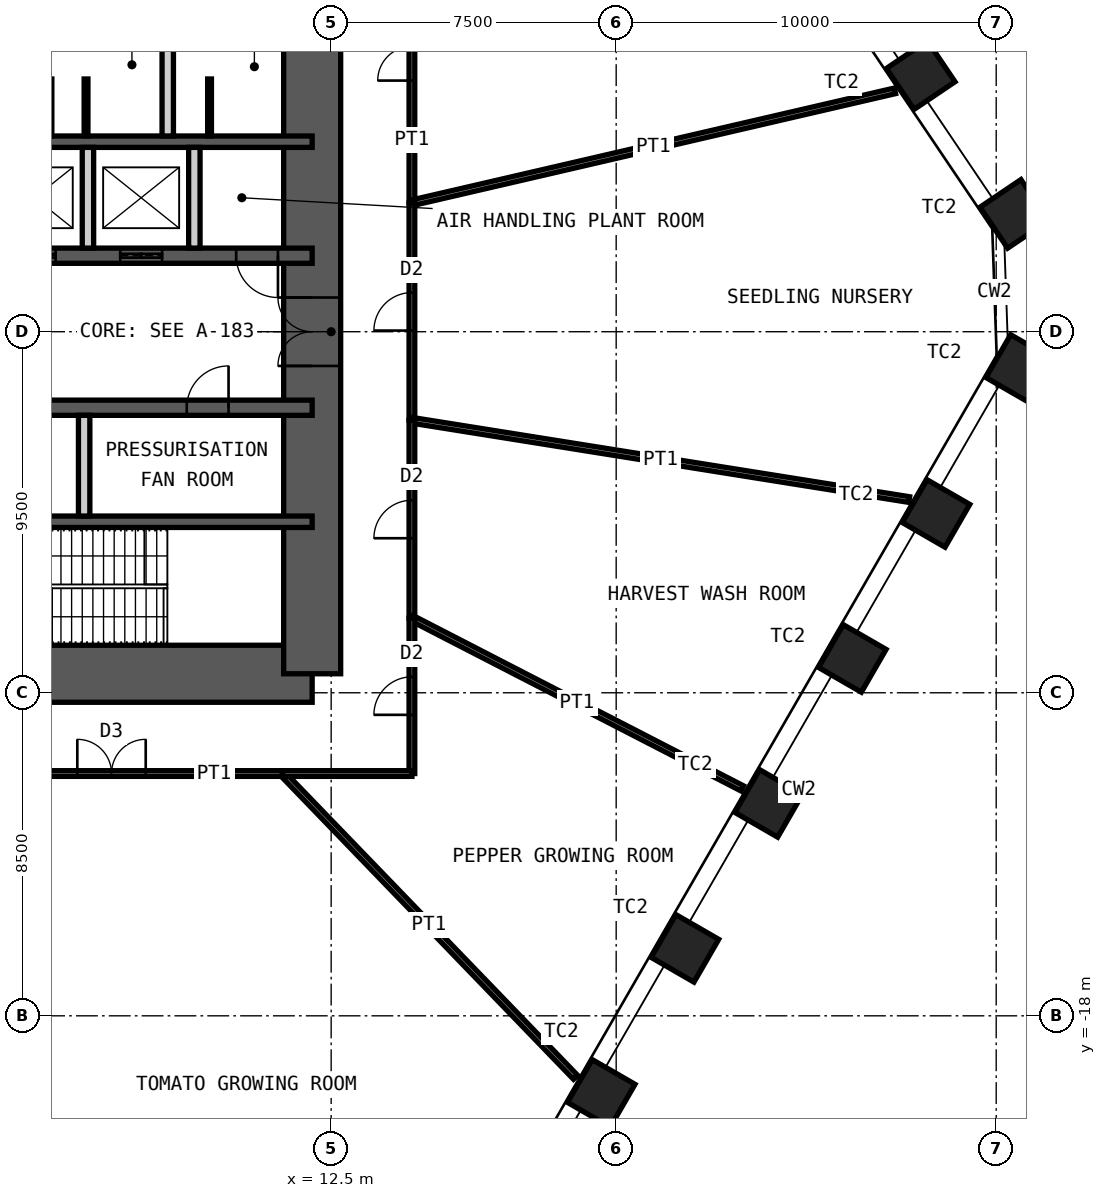
"""IFC4 building model, lengths in metres.
Left out: names, types, materials, properties, quantities, classifications, styles, units other than length and angle.
Written with IfcOpenShell. Run it as: python <this file> out.ifc"""

import sys

from ifc_helpers import new_model, si_unit, direction, frame, frame_2d, origin, origin_2d, place, context, subcontext, project, spatial, rectangle, hollow_rectangle, extrude, element, fill, save


model = new_model("IFC4")
c1 = context("Model", 3, precision=1e-05, world=origin(), true_north=direction((0.0, 1.0)))
c2 = subcontext(c1, "Body", "Model", "MODEL_VIEW")
j1 = project(units=[si_unit("LENGTHUNIT", "METRE"), si_unit("PLANEANGLEUNIT", "RADIAN")], contexts=[c1])
p1 = place(None, origin())
s1 = spatial("IfcSite", under=j1, at=p1, CompositionType="ELEMENT")
p2 = place(p1, origin())
s2 = spatial("IfcBuilding", under=s1, at=p2, CompositionType="ELEMENT")
p3 = place(p2, frame((0.0, 0.0, 77.0)))
s3 = spatial("IfcBuildingStorey", under=s2, at=p3, CompositionType="ELEMENT", Elevation=77.0)
for number, where, z_axis, x_axis in (
    (1, (28.013, 6.752, 0.0), (0.0, 0.0, 1.0), (-0.559, 0.829, 0.0)),
    (2, (30.476, 3.101, 0.0), (0.0, 0.0, 1.0), (-0.559, 0.829, 0.0)),
    (3, (30.618, -0.967, 0.0), (0.0, 0.0, 1.0), (0.5, 0.866, 0.0)),
    (4, (28.416, -4.782, 0.0), (0.0, 0.0, 1.0), (0.5, 0.866, 0.0)),
    (5, (26.214, -8.596, 0.0), (0.0, 0.0, 1.0), (0.5, 0.866, 0.0)),
    (6, (24.011, -12.411, 0.0), (0.0, 0.0, 1.0), (0.5, 0.866, 0.0)),
    (7, (21.809, -16.225, 0.0), (0.0, 0.0, 1.0), (0.5, 0.866, 0.0)),
    (8, (19.607, -20.04, 0.0), (0.0, 0.0, 1.0), (0.5, 0.866, 0.0)),
):
    element("IfcColumn", number, at=place(p3, frame(where, z_axis=z_axis, x_axis=x_axis)), inside=s3, PredefinedType="COLUMN", context=c2, shape_type="SweptSolid", body=[
        extrude(hollow_rectangle(XDim=1.3, YDim=1.3, WallThickness=0.1, at=origin_2d()), origin(), (0.0, 0.0, 1.0), 5.0),
    ])
p4 = place(p3, frame((-12.0, -9.0, 0.0), z_axis=(0.0, 0.0, 1.0), x_axis=(1.0, 0.0, 0.0)))
e9 = element("IfcWall", 9, at=p4, inside=s3, PredefinedType="SHEAR", context=c2, shape_type="SweptSolid", body=[
    extrude(rectangle(XDim=24.0, YDim=1.5, at=frame_2d((12.0, 0.0))), origin(), (0.0, 0.0, 1.0), 5.0),
])
p5 = place(p4, frame((1.35, 0.0, 0.0)))
e10 = element("IfcOpeningElement", 10, at=p5, cuts=e9, PredefinedType="OPENING", context=c2, shape_type="SweptSolid", body=[
    extrude(rectangle(XDim=1.0, YDim=2.1, at=frame_2d((0.5, 1.05))), frame((0.0, 0.76, 0.0), z_axis=(0.0, -1.0, 0.0), x_axis=(1.0, 0.0, 0.0)), (0.0, 0.0, 1.0), 1.52),
])
p6 = place(p4, frame((5.325, 0.0, 0.0)))
e11 = element("IfcOpeningElement", 11, at=p6, cuts=e9, PredefinedType="OPENING", context=c2, shape_type="SweptSolid", body=[
    extrude(rectangle(XDim=1.15, YDim=2.1, at=frame_2d((0.575, 1.05))), frame((0.0, 0.76, 0.0), z_axis=(0.0, -1.0, 0.0), x_axis=(1.0, 0.0, 0.0)), (0.0, 0.0, 1.0), 1.52),
])
p7 = place(p4, frame((12.6, 0.0, 0.0)))
e12 = element("IfcOpeningElement", 12, at=p7, cuts=e9, PredefinedType="OPENING", context=c2, shape_type="SweptSolid", body=[
    extrude(rectangle(XDim=1.0, YDim=2.1, at=frame_2d((0.5, 1.05))), frame((0.0, 0.76, 0.0), z_axis=(0.0, -1.0, 0.0), x_axis=(1.0, 0.0, 0.0)), (0.0, 0.0, 1.0), 1.52),
])
p8 = place(p3, frame((12.0, -9.0, 0.0), z_axis=(0.0, 0.0, 1.0), x_axis=(0.0, 1.0, 0.0)))
e13 = element("IfcWall", 13, at=p8, inside=s3, PredefinedType="SHEAR", context=c2, shape_type="SweptSolid", body=[
    extrude(rectangle(XDim=18.0, YDim=1.5, at=frame_2d((9.0, 0.0))), origin(), (0.0, 0.0, 1.0), 5.0),
])
p9 = place(p8, frame((8.1, 0.0, 0.0)))
e14 = element("IfcOpeningElement", 14, at=p9, cuts=e13, PredefinedType="OPENING", context=c2, shape_type="SweptSolid", body=[
    extrude(rectangle(XDim=1.8, YDim=2.1, at=frame_2d((0.9, 1.05))), frame((0.0, 0.76, 0.0), z_axis=(0.0, -1.0, 0.0), x_axis=(1.0, 0.0, 0.0)), (0.0, 0.0, 1.0), 1.52),
])
p10 = place(p3, frame((-12.0, 5.0, 0.0), z_axis=(0.0, 0.0, 1.0), x_axis=(1.0, 0.0, 0.0)))
e15 = element("IfcWall", 15, at=p10, inside=s3, PredefinedType="SHEAR", context=c2, shape_type="SweptSolid", body=[
    extrude(rectangle(XDim=24.0, YDim=0.3, at=frame_2d((12.0, 0.0))), origin(), (0.0, 0.0, 1.0), 5.0),
])
p11 = place(p3, frame((-12.0, 2.0, 0.0), z_axis=(0.0, 0.0, 1.0), x_axis=(1.0, 0.0, 0.0)))
e16 = element("IfcWall", 16, at=p11, inside=s3, PredefinedType="SHEAR", context=c2, shape_type="SweptSolid", body=[
    extrude(rectangle(XDim=24.0, YDim=0.4, at=frame_2d((12.0, 0.0))), origin(), (0.0, 0.0, 1.0), 5.0),
])
p12 = place(p11, frame((2.4, 0.0, 0.0)))
e17 = element("IfcOpeningElement", 17, at=p12, cuts=e16, PredefinedType="OPENING", context=c2, shape_type="SweptSolid", body=[
    extrude(rectangle(XDim=1.1, YDim=2.1, at=frame_2d((0.55, 1.05))), frame((0.0, 0.21, 0.0), z_axis=(0.0, -1.0, 0.0), x_axis=(1.0, 0.0, 0.0)), (0.0, 0.0, 1.0), 0.42),
])
p13 = place(p11, frame((22.0, 0.0, 0.0)))
e18 = element("IfcOpeningElement", 18, at=p13, cuts=e16, PredefinedType="OPENING", context=c2, shape_type="SweptSolid", body=[
    extrude(rectangle(XDim=1.1, YDim=2.1, at=frame_2d((0.55, 1.05))), frame((0.0, 0.21, 0.0), z_axis=(0.0, -1.0, 0.0), x_axis=(1.0, 0.0, 0.0)), (0.0, 0.0, 1.0), 0.42),
])
p14 = place(p11, frame((10.15, 0.0, 0.0)))
e19 = element("IfcOpeningElement", 19, at=p14, cuts=e16, PredefinedType="OPENING", context=c2, shape_type="SweptSolid", body=[
    extrude(rectangle(XDim=1.0, YDim=2.1, at=frame_2d((0.5, 1.05))), frame((0.0, 0.21, 0.0), z_axis=(0.0, -1.0, 0.0), x_axis=(1.0, 0.0, 0.0)), (0.0, 0.0, 1.0), 0.42),
])
p15 = place(p11, frame((6.7, 0.0, 0.0)))
e20 = element("IfcOpeningElement", 20, at=p15, cuts=e16, PredefinedType="OPENING", context=c2, shape_type="SweptSolid", body=[
    extrude(rectangle(XDim=1.4, YDim=2.4, at=frame_2d((0.7, 1.2))), frame((0.0, 0.21, 0.0), z_axis=(0.0, -1.0, 0.0), x_axis=(1.0, 0.0, 0.0)), (0.0, 0.0, 1.0), 0.42),
])
p16 = place(p11, frame((13.35, 0.0, 0.0)))
e21 = element("IfcOpeningElement", 21, at=p16, cuts=e16, PredefinedType="OPENING", context=c2, shape_type="SweptSolid", body=[
    extrude(rectangle(XDim=1.1, YDim=2.4, at=frame_2d((0.55, 1.2))), frame((0.0, 0.21, 0.0), z_axis=(0.0, -1.0, 0.0), x_axis=(1.0, 0.0, 0.0)), (0.0, 0.0, 1.0), 0.42),
])
p17 = place(p11, frame((16.15, 0.0, 0.0)))
e22 = element("IfcOpeningElement", 22, at=p17, cuts=e16, PredefinedType="OPENING", context=c2, shape_type="SweptSolid", body=[
    extrude(rectangle(XDim=1.1, YDim=2.4, at=frame_2d((0.55, 1.2))), frame((0.0, 0.21, 0.0), z_axis=(0.0, -1.0, 0.0), x_axis=(1.0, 0.0, 0.0)), (0.0, 0.0, 1.0), 0.42),
])
p18 = place(p11, frame((18.95, 0.0, 0.0)))
e23 = element("IfcOpeningElement", 23, at=p18, cuts=e16, PredefinedType="OPENING", context=c2, shape_type="SweptSolid", body=[
    extrude(rectangle(XDim=1.1, YDim=2.4, at=frame_2d((0.55, 1.2))), frame((0.0, 0.21, 0.0), z_axis=(0.0, -1.0, 0.0), x_axis=(1.0, 0.0, 0.0)), (0.0, 0.0, 1.0), 0.42),
])
p19 = place(p3, frame((-12.0, -2.0, 0.0), z_axis=(0.0, 0.0, 1.0), x_axis=(1.0, 0.0, 0.0)))
e24 = element("IfcWall", 24, at=p19, inside=s3, PredefinedType="SHEAR", context=c2, shape_type="SweptSolid", body=[
    extrude(rectangle(XDim=24.0, YDim=0.4, at=frame_2d((12.0, 0.0))), origin(), (0.0, 0.0, 1.0), 5.0),
])
p20 = place(p19, frame((1.1, 0.0, 0.0)))
e25 = element("IfcOpeningElement", 25, at=p20, cuts=e24, PredefinedType="OPENING", context=c2, shape_type="SweptSolid", body=[
    extrude(rectangle(XDim=1.1, YDim=2.1, at=frame_2d((0.55, 1.05))), frame((0.0, 0.21, 0.0), z_axis=(0.0, -1.0, 0.0), x_axis=(1.0, 0.0, 0.0)), (0.0, 0.0, 1.0), 0.42),
])
p21 = place(p19, frame((13.55, 0.0, 0.0)))
e26 = element("IfcOpeningElement", 26, at=p21, cuts=e24, PredefinedType="OPENING", context=c2, shape_type="SweptSolid", body=[
    extrude(rectangle(XDim=1.1, YDim=2.1, at=frame_2d((0.55, 1.05))), frame((0.0, 0.21, 0.0), z_axis=(0.0, -1.0, 0.0), x_axis=(1.0, 0.0, 0.0)), (0.0, 0.0, 1.0), 0.42),
])
p22 = place(p19, frame((20.7, 0.0, 0.0)))
e27 = element("IfcOpeningElement", 27, at=p22, cuts=e24, PredefinedType="OPENING", context=c2, shape_type="SweptSolid", body=[
    extrude(rectangle(XDim=1.1, YDim=2.1, at=frame_2d((0.55, 1.05))), frame((0.0, 0.21, 0.0), z_axis=(0.0, -1.0, 0.0), x_axis=(1.0, 0.0, 0.0)), (0.0, 0.0, 1.0), 0.42),
])
p23 = place(p3, frame((-12.0, -5.0, 0.0), z_axis=(0.0, 0.0, 1.0), x_axis=(1.0, 0.0, 0.0)))
e28 = element("IfcWall", 28, at=p23, inside=s3, PredefinedType="SHEAR", context=c2, shape_type="SweptSolid", body=[
    extrude(rectangle(XDim=24.0, YDim=0.3, at=frame_2d((12.0, 0.0))), origin(), (0.0, 0.0, 1.0), 5.0),
])
p24 = place(p3, frame((8.2, 5.15, 0.0), z_axis=(0.0, 0.0, 1.0), x_axis=(0.0, 1.0, 0.0)))
e29 = element("IfcWall", 29, at=p24, inside=s3, PredefinedType="PARTITIONING", context=c2, shape_type="SweptSolid", body=[
    extrude(rectangle(XDim=3.85, YDim=0.3, at=frame_2d((1.925, 0.0))), origin(), (0.0, 0.0, 1.0), 4.78),
])
for number, where, z_axis, x_axis in (
    (30, (6.1, 2.2, 0.0), (0.0, 0.0, 1.0), (0.0, 1.0, 0.0)),
    (31, (8.9, 2.2, 0.0), (0.0, 0.0, 1.0), (0.0, 1.0, 0.0)),
    (32, (6.0, -4.85, 0.0), (0.0, 0.0, 1.0), (0.0, 1.0, 0.0)),
):
    element("IfcWall", number, at=place(p3, frame(where, z_axis=z_axis, x_axis=x_axis)), inside=s3, PredefinedType="PARTITIONING", context=c2, shape_type="SweptSolid", body=[
        extrude(rectangle(XDim=2.65, YDim=0.3, at=frame_2d((1.325, 0.0))), origin(), (0.0, 0.0, 1.0), 4.78),
    ])
for number, where, z_axis, x_axis in (
    (33, (5.1, 5.15, 0.0), (0.0, 0.0, 1.0), (0.0, 1.0, 0.0)),
    (34, (6.05, 5.15, 0.0), (0.0, 0.0, 1.0), (0.0, 1.0, 0.0)),
    (35, (9.3, 5.15, 0.0), (0.0, 0.0, 1.0), (0.0, 1.0, 0.0)),
):
    element("IfcWall", number, at=place(p3, frame(where, z_axis=z_axis, x_axis=x_axis)), inside=s3, PredefinedType="PARTITIONING", context=c2, shape_type="SweptSolid", body=[
        extrude(rectangle(XDim=1.5, YDim=0.1, at=frame_2d((0.75, 0.0))), origin(), (0.0, 0.0, 1.0), 2.1),
    ])
p25 = place(p3, frame((18.931, -19.618, 0.0), z_axis=(0.0, 0.0, 1.0), x_axis=(-0.694400324326, 0.719588903178, 0.0)))
e36 = element("IfcWall", 36, at=p25, inside=s3, PredefinedType="PARTITIONING", context=c2, shape_type="SweptSolid", body=[
    extrude(rectangle(XDim=11.108, YDim=0.15, at=frame_2d((5.554, 0.0))), origin(), (0.0, 0.0, 1.0), 3.7),
])
p26 = place(p3, frame((11.218, -11.625, 0.0), z_axis=(0.0, 0.0, 1.0), x_axis=(-1.0, 0.0, 0.0)))
e37 = element("IfcWall", 37, at=p26, inside=s3, PredefinedType="PARTITIONING", context=c2, shape_type="SweptSolid", body=[
    extrude(rectangle(XDim=8.996, YDim=0.15, at=frame_2d((4.498, 0.0))), origin(), (0.0, 0.0, 1.0), 4.8),
])
p27 = place(p26, frame((3.598, 0.0, 0.0)))
e38 = element("IfcOpeningElement", 38, at=p27, cuts=e37, PredefinedType="OPENING", context=c2, shape_type="SweptSolid", body=[
    extrude(rectangle(XDim=1.8, YDim=2.4, at=frame_2d((0.9, 1.2))), frame((0.0, 0.085, 0.0), z_axis=(0.0, -1.0, 0.0), x_axis=(1.0, 0.0, 0.0)), (0.0, 0.0, 1.0), 0.17),
])
p28 = place(p3, frame((14.625, 11.625, 0.0), z_axis=(0.0, 0.0, 1.0), x_axis=(0.0, -1.0, 0.0)))
e39 = element("IfcWall", 39, at=p28, inside=s3, PredefinedType="PARTITIONING", context=c2, shape_type="SweptSolid", body=[
    extrude(rectangle(XDim=8.234, YDim=0.15, at=frame_2d((4.117, 0.0))), origin(), (0.0, 0.0, 1.0), 4.8),
])
p29 = place(p28, frame((3.217, 0.0, 0.0)))
e40 = element("IfcOpeningElement", 40, at=p29, cuts=e39, PredefinedType="OPENING", context=c2, shape_type="SweptSolid", body=[
    extrude(rectangle(XDim=1.8, YDim=2.4, at=frame_2d((0.9, 1.2))), frame((0.0, 0.085, 0.0), z_axis=(0.0, -1.0, 0.0), x_axis=(1.0, 0.0, 0.0)), (0.0, 0.0, 1.0), 0.17),
])
p30 = place(p3, frame((27.336, 6.338, 0.0), z_axis=(0.0, 0.0, 1.0), x_axis=(-0.974155090553, -0.225880188486, 0.0)))
e41 = element("IfcWall", 41, at=p30, inside=s3, PredefinedType="PARTITIONING", context=c2, shape_type="SweptSolid", body=[
    extrude(rectangle(XDim=13.048, YDim=0.15, at=frame_2d((6.524, 0.0))), origin(), (0.0, 0.0, 1.0), 3.7),
])
p31 = place(p3, frame((14.625, 3.391, 0.0), z_axis=(0.0, 0.0, 1.0), x_axis=(0.0, -1.0, 0.0)))
e42 = element("IfcWall", 42, at=p31, inside=s3, PredefinedType="PARTITIONING", context=c2, shape_type="SweptSolid", body=[
    extrude(rectangle(XDim=5.722, YDim=0.15, at=frame_2d((2.861, 0.0))), origin(), (0.0, 0.0, 1.0), 4.8),
])
p32 = place(p31, frame((2.361, 0.0, 0.0)))
e43 = element("IfcOpeningElement", 43, at=p32, cuts=e42, PredefinedType="OPENING", context=c2, shape_type="SweptSolid", body=[
    extrude(rectangle(XDim=1.0, YDim=2.4, at=frame_2d((0.5, 1.2))), frame((0.0, 0.085, 0.0), z_axis=(0.0, -1.0, 0.0), x_axis=(1.0, 0.0, 0.0)), (0.0, 0.0, 1.0), 0.17),
])
p33 = place(p3, frame((27.711, -4.416, 0.0), z_axis=(0.0, 0.0, 1.0), x_axis=(-0.987538625309, 0.15737682016, 0.0)))
e44 = element("IfcWall", 44, at=p33, inside=s3, PredefinedType="PARTITIONING", context=c2, shape_type="SweptSolid", body=[
    extrude(rectangle(XDim=13.251, YDim=0.15, at=frame_2d((6.625, 0.0))), origin(), (0.0, 0.0, 1.0), 3.7),
])
p34 = place(p3, frame((14.625, -2.331, 0.0), z_axis=(0.0, 0.0, 1.0), x_axis=(0.0, -1.0, 0.0)))
e45 = element("IfcWall", 45, at=p34, inside=s3, PredefinedType="PARTITIONING", context=c2, shape_type="SweptSolid", body=[
    extrude(rectangle(XDim=5.206, YDim=0.15, at=frame_2d((2.603, 0.0))), origin(), (0.0, 0.0, 1.0), 4.8),
])
p35 = place(p34, frame((2.103, 0.0, 0.0)))
e46 = element("IfcOpeningElement", 46, at=p35, cuts=e45, PredefinedType="OPENING", context=c2, shape_type="SweptSolid", body=[
    extrude(rectangle(XDim=1.0, YDim=2.4, at=frame_2d((0.5, 1.2))), frame((0.0, 0.085, 0.0), z_axis=(0.0, -1.0, 0.0), x_axis=(1.0, 0.0, 0.0)), (0.0, 0.0, 1.0), 0.17),
])
p36 = place(p3, frame((23.316, -12.015, 0.0), z_axis=(0.0, 0.0, 1.0), x_axis=(-0.888917561609, 0.458067209767, 0.0)))
e47 = element("IfcWall", 47, at=p36, inside=s3, PredefinedType="PARTITIONING", context=c2, shape_type="SweptSolid", body=[
    extrude(rectangle(XDim=9.778, YDim=0.15, at=frame_2d((4.889, 0.0))), origin(), (0.0, 0.0, 1.0), 3.7),
])
p37 = place(p3, frame((14.625, -7.536, 0.0), z_axis=(0.0, 0.0, 1.0), x_axis=(0.0, -1.0, 0.0)))
e48 = element("IfcWall", 48, at=p37, inside=s3, PredefinedType="PARTITIONING", context=c2, shape_type="SweptSolid", body=[
    extrude(rectangle(XDim=4.089, YDim=0.15, at=frame_2d((2.044, 0.0))), origin(), (0.0, 0.0, 1.0), 4.8),
])
p38 = place(p37, frame((1.544, 0.0, 0.0)))
e49 = element("IfcOpeningElement", 49, at=p38, cuts=e48, PredefinedType="OPENING", context=c2, shape_type="SweptSolid", body=[
    extrude(rectangle(XDim=1.0, YDim=2.4, at=frame_2d((0.5, 1.2))), frame((0.0, 0.085, 0.0), z_axis=(0.0, -1.0, 0.0), x_axis=(1.0, 0.0, 0.0)), (0.0, 0.0, 1.0), 0.17),
])
p39 = place(p3, frame((14.625, -11.625, 0.0), z_axis=(0.0, 0.0, 1.0), x_axis=(-1.0, 0.0, 0.0)))
e50 = element("IfcWall", 50, at=p39, inside=s3, PredefinedType="PARTITIONING", context=c2, shape_type="SweptSolid", body=[
    extrude(rectangle(XDim=3.407, YDim=0.15, at=frame_2d((1.704, 0.0))), origin(), (0.0, 0.0, 1.0), 4.8),
])
p40 = place(p13, origin())
e51 = element("IfcDoor", 51, at=p40, inside=s3, OperationType="SINGLE_SWING_RIGHT", PredefinedType="DOOR", context=c2, shape_type="SweptSolid", body=[
    extrude(rectangle(XDim=1.1, YDim=2.1, at=frame_2d((0.55, 1.05))), frame((0.0, 0.025, 0.0), z_axis=(0.0, -1.0, 0.0), x_axis=(1.0, 0.0, 0.0)), (0.0, 0.0, 1.0), 0.05),
])
fill(e18, e51)
p41 = place(p22, origin())
e52 = element("IfcDoor", 52, at=p41, inside=s3, OperationType="SINGLE_SWING_LEFT", PredefinedType="DOOR", context=c2, shape_type="SweptSolid", body=[
    extrude(rectangle(XDim=1.1, YDim=2.1, at=frame_2d((0.55, 1.05))), frame((0.0, 0.025, 0.0), z_axis=(0.0, -1.0, 0.0), x_axis=(1.0, 0.0, 0.0)), (0.0, 0.0, 1.0), 0.05),
])
fill(e27, e52)
p42 = place(p9, origin())
e53 = element("IfcDoor", 53, at=p42, inside=s3, OperationType="DOUBLE_DOOR_DOUBLE_SWING", PredefinedType="DOOR", context=c2, shape_type="SweptSolid", body=[
    extrude(rectangle(XDim=1.8, YDim=2.1, at=frame_2d((0.9, 1.05))), frame((0.0, 0.025, 0.0), z_axis=(0.0, -1.0, 0.0), x_axis=(1.0, 0.0, 0.0)), (0.0, 0.0, 1.0), 0.05),
])
fill(e14, e53)
p43 = place(p17, origin())
e54 = element("IfcDoor", 54, at=p43, inside=s3, OperationType="DOUBLE_DOOR_SLIDING", PredefinedType="DOOR", context=c2, shape_type="SweptSolid", body=[
    extrude(rectangle(XDim=1.1, YDim=2.4, at=frame_2d((0.55, 1.2))), frame((0.0, 0.025, 0.0), z_axis=(0.0, -1.0, 0.0), x_axis=(1.0, 0.0, 0.0)), (0.0, 0.0, 1.0), 0.05),
])
fill(e22, e54)
p44 = place(p18, origin())
e55 = element("IfcDoor", 55, at=p44, inside=s3, OperationType="DOUBLE_DOOR_SLIDING", PredefinedType="DOOR", context=c2, shape_type="SweptSolid", body=[
    extrude(rectangle(XDim=1.1, YDim=2.4, at=frame_2d((0.55, 1.2))), frame((0.0, 0.025, 0.0), z_axis=(0.0, -1.0, 0.0), x_axis=(1.0, 0.0, 0.0)), (0.0, 0.0, 1.0), 0.05),
])
fill(e23, e55)
p45 = place(p27, origin())
e56 = element("IfcDoor", 56, at=p45, inside=s3, OperationType="DOUBLE_DOOR_DOUBLE_SWING", PredefinedType="DOOR", context=c2, shape_type="SweptSolid", body=[
    extrude(rectangle(XDim=1.8, YDim=2.4, at=frame_2d((0.9, 1.2))), frame((0.0, 0.025, 0.0), z_axis=(0.0, -1.0, 0.0), x_axis=(1.0, 0.0, 0.0)), (0.0, 0.0, 1.0), 0.05),
])
fill(e38, e56)
p46 = place(p29, origin())
e57 = element("IfcDoor", 57, at=p46, inside=s3, OperationType="DOUBLE_DOOR_DOUBLE_SWING", PredefinedType="DOOR", context=c2, shape_type="SweptSolid", body=[
    extrude(rectangle(XDim=1.8, YDim=2.4, at=frame_2d((0.9, 1.2))), frame((0.0, 0.025, 0.0), z_axis=(0.0, -1.0, 0.0), x_axis=(1.0, 0.0, 0.0)), (0.0, 0.0, 1.0), 0.05),
])
fill(e40, e57)
p47 = place(p32, origin())
e58 = element("IfcDoor", 58, at=p47, inside=s3, OperationType="SINGLE_SWING_RIGHT", PredefinedType="DOOR", context=c2, shape_type="SweptSolid", body=[
    extrude(rectangle(XDim=1.0, YDim=2.4, at=frame_2d((0.5, 1.2))), frame((0.0, 0.025, 0.0), z_axis=(0.0, -1.0, 0.0), x_axis=(1.0, 0.0, 0.0)), (0.0, 0.0, 1.0), 0.05),
])
fill(e43, e58)
p48 = place(p35, origin())
e59 = element("IfcDoor", 59, at=p48, inside=s3, OperationType="SINGLE_SWING_RIGHT", PredefinedType="DOOR", context=c2, shape_type="SweptSolid", body=[
    extrude(rectangle(XDim=1.0, YDim=2.4, at=frame_2d((0.5, 1.2))), frame((0.0, 0.025, 0.0), z_axis=(0.0, -1.0, 0.0), x_axis=(1.0, 0.0, 0.0)), (0.0, 0.0, 1.0), 0.05),
])
fill(e46, e59)
p49 = place(p38, origin())
e60 = element("IfcDoor", 60, at=p49, inside=s3, OperationType="SINGLE_SWING_RIGHT", PredefinedType="DOOR", context=c2, shape_type="SweptSolid", body=[
    extrude(rectangle(XDim=1.0, YDim=2.4, at=frame_2d((0.5, 1.2))), frame((0.0, 0.025, 0.0), z_axis=(0.0, -1.0, 0.0), x_axis=(1.0, 0.0, 0.0)), (0.0, 0.0, 1.0), 0.05),
])
fill(e49, e60)
save(model, sys.argv[1])
